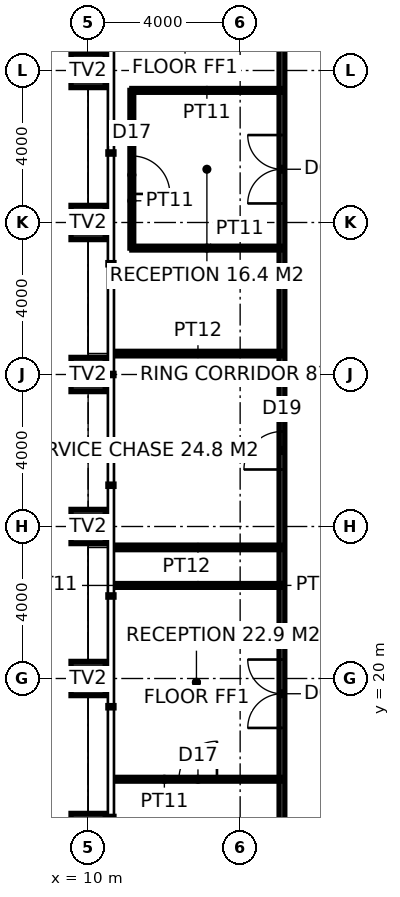
"""IFC4 building model, lengths in metres.
Left out: names, types, materials, properties, quantities, classifications, styles, units other than length and angle.
Written with IfcOpenShell. Run it as: python <this file> out.ifc"""

import sys

from ifc_helpers import new_model, si_unit, direction, frame, frame_2d, origin, origin_2d, place, context, subcontext, project, spatial, rectangle, hollow_rectangle, extrude, element, fill, save


model = new_model("IFC4")
c1 = context("Model", 3, precision=1e-05, world=origin(), true_north=direction((0.0, 1.0)))
c2 = subcontext(c1, "Body", "Model", "MODEL_VIEW")
j1 = project(units=[si_unit("LENGTHUNIT", "METRE"), si_unit("PLANEANGLEUNIT", "RADIAN")], contexts=[c1])
p1 = place(None, origin())
s1 = spatial("IfcSite", under=j1, at=p1, CompositionType="ELEMENT")
p2 = place(p1, origin())
s2 = spatial("IfcBuilding", under=s1, at=p2, CompositionType="ELEMENT")
p3 = place(p2, frame((0.0, 0.0, 105.4)))
s3 = spatial("IfcBuildingStorey", under=s2, at=p3, CompositionType="ELEMENT", Elevation=105.4)
for number, where, z_axis, x_axis in (
    (1, (10.0, 16.0, 0.0), (0.0, 0.0, 1.0), (1.0, 0.0, 0.0)),
    (2, (10.0, 20.0, 0.0), (0.0, 0.0, 1.0), (1.0, 0.0, 0.0)),
    (3, (10.0, 24.0, 0.0), (0.0, 0.0, 1.0), (1.0, 0.0, 0.0)),
    (4, (10.0, 28.0, 0.0), (0.0, 0.0, 1.0), (1.0, 0.0, 0.0)),
    (5, (10.0, 32.0, 0.0), (0.0, 0.0, 1.0), (1.0, 0.0, 0.0)),
    (6, (10.0, 36.0, 0.0), (0.0, 0.0, 1.0), (1.0, 0.0, 0.0)),
):
    element("IfcColumn", number, at=place(p3, frame(where, z_axis=z_axis, x_axis=x_axis)), inside=s3, PredefinedType="USERDEFINED", context=c2, shape_type="SweptSolid", body=[
        extrude(hollow_rectangle(XDim=0.9, YDim=0.9, WallThickness=0.1, at=origin_2d()), origin(), (0.0, 0.0, 1.0), 4.0),
    ])
p4 = place(p3, frame((15.1, 15.625, 0.0), z_axis=(0.0, 0.0, 1.0), x_axis=(0.0, 1.0, 0.0)))
e7 = element("IfcWall", 7, at=p4, inside=s3, PredefinedType="PARTITIONING", context=c2, shape_type="SweptSolid", body=[
    extrude(rectangle(XDim=22.75, YDim=0.15, at=frame_2d((11.375, 0.0))), origin(), (0.0, 0.0, 1.0), 3.85),
])
p5 = place(p4, frame((3.074, 0.0, 0.0)))
e8 = element("IfcOpeningElement", 8, at=p5, cuts=e7, PredefinedType="OPENING", context=c2, shape_type="SweptSolid", body=[
    extrude(rectangle(XDim=1.8, YDim=2.4, at=frame_2d((0.9, 1.2))), frame((0.0, 0.085, 0.0), z_axis=(0.0, -1.0, 0.0), x_axis=(1.0, 0.0, 0.0)), (0.0, 0.0, 1.0), 0.17),
])
p6 = place(p4, frame((16.876, 0.0, 0.0)))
e9 = element("IfcOpeningElement", 9, at=p6, cuts=e7, PredefinedType="OPENING", context=c2, shape_type="SweptSolid", body=[
    extrude(rectangle(XDim=1.8, YDim=2.4, at=frame_2d((0.9, 1.2))), frame((0.0, 0.085, 0.0), z_axis=(0.0, -1.0, 0.0), x_axis=(1.0, 0.0, 0.0)), (0.0, 0.0, 1.0), 0.17),
])
p7 = place(p4, frame((9.875, 0.0, 0.0)))
e10 = element("IfcOpeningElement", 10, at=p7, cuts=e7, PredefinedType="OPENING", context=c2, shape_type="SweptSolid", body=[
    extrude(rectangle(XDim=1.0, YDim=2.2, at=frame_2d((0.5, 1.1))), frame((0.0, 0.085, 0.0), z_axis=(0.0, -1.0, 0.0), x_axis=(1.0, 0.0, 0.0)), (0.0, 0.0, 1.0), 0.17),
])
for number, where, z_axis, x_axis in (
    (11, (10.68, 23.45, 0.0), (0.0, 0.0, 1.0), (1.0, 0.0, 0.0)),
    (12, (10.68, 28.55, 0.0), (0.0, 0.0, 1.0), (1.0, 0.0, 0.0)),
):
    element("IfcWall", number, at=place(p3, frame(where, z_axis=z_axis, x_axis=x_axis)), inside=s3, PredefinedType="PARTITIONING", context=c2, shape_type="SweptSolid", body=[
        extrude(rectangle(XDim=4.42, YDim=0.12, at=frame_2d((2.21, 0.0))), origin(), (0.0, 0.0, 1.0), 2.65),
    ])
p8 = place(p3, frame((15.1, 22.449, 0.0), z_axis=(0.0, 0.0, 1.0), x_axis=(-1.0, 0.0, 0.0)))
e13 = element("IfcWall", 13, at=p8, inside=s3, PredefinedType="PARTITIONING", context=c2, shape_type="SweptSolid", body=[
    extrude(rectangle(XDim=4.42, YDim=0.1, at=frame_2d((2.21, 0.0))), origin(), (0.0, 0.0, 1.0), 3.85),
])
p9 = place(p3, frame((10.68, 17.349, 0.0), z_axis=(0.0, 0.0, 1.0), x_axis=(1.0, 0.0, 0.0)))
e14 = element("IfcWall", 14, at=p9, inside=s3, PredefinedType="PARTITIONING", context=c2, shape_type="SweptSolid", body=[
    extrude(rectangle(XDim=4.42, YDim=0.1, at=frame_2d((2.21, 0.0))), origin(), (0.0, 0.0, 1.0), 3.85),
])
p10 = place(p9, frame((1.71, 0.0, 0.0)))
e15 = element("IfcOpeningElement", 15, at=p10, cuts=e14, PredefinedType="OPENING", context=c2, shape_type="SweptSolid", body=[
    extrude(rectangle(XDim=1.0, YDim=2.2, at=frame_2d((0.5, 1.1))), frame((0.0, 0.06, 0.0), z_axis=(0.0, -1.0, 0.0), x_axis=(1.0, 0.0, 0.0)), (0.0, 0.0, 1.0), 0.12),
])
p11 = place(p3, frame((15.1, 35.476, 0.0), z_axis=(0.0, 0.0, 1.0), x_axis=(-1.0, 0.0, 0.0)))
e16 = element("IfcWall", 16, at=p11, inside=s3, PredefinedType="PARTITIONING", context=c2, shape_type="SweptSolid", body=[
    extrude(rectangle(XDim=3.95, YDim=0.1, at=frame_2d((1.975, 0.0))), origin(), (0.0, 0.0, 1.0), 3.85),
])
p12 = place(p3, frame((11.15, 35.476, 0.0), z_axis=(0.0, 0.0, 1.0), x_axis=(0.0, -1.0, 0.0)))
e17 = element("IfcWall", 17, at=p12, inside=s3, PredefinedType="PARTITIONING", context=c2, shape_type="SweptSolid", body=[
    extrude(rectangle(XDim=4.15, YDim=0.1, at=frame_2d((2.075, 0.0))), origin(), (0.0, 0.0, 1.0), 3.85),
])
p13 = place(p12, frame((1.725, 0.0, 0.0)))
e18 = element("IfcOpeningElement", 18, at=p13, cuts=e17, PredefinedType="OPENING", context=c2, shape_type="SweptSolid", body=[
    extrude(rectangle(XDim=1.0, YDim=2.2, at=frame_2d((0.5, 1.1))), frame((0.0, 0.06, 0.0), z_axis=(0.0, -1.0, 0.0), x_axis=(1.0, 0.0, 0.0)), (0.0, 0.0, 1.0), 0.12),
])
p14 = place(p3, frame((11.15, 31.326, 0.0), z_axis=(0.0, 0.0, 1.0), x_axis=(1.0, 0.0, 0.0)))
e19 = element("IfcWall", 19, at=p14, inside=s3, PredefinedType="PARTITIONING", context=c2, shape_type="SweptSolid", body=[
    extrude(rectangle(XDim=3.95, YDim=0.1, at=frame_2d((1.975, 0.0))), origin(), (0.0, 0.0, 1.0), 3.85),
])
p15 = place(p5, origin())
e20 = element("IfcDoor", 20, at=p15, inside=s3, OperationType="DOUBLE_DOOR_DOUBLE_SWING", PredefinedType="DOOR", context=c2, shape_type="SweptSolid", body=[
    extrude(rectangle(XDim=1.8, YDim=2.4, at=frame_2d((0.9, 1.2))), frame((0.0, 0.025, 0.0), z_axis=(0.0, -1.0, 0.0), x_axis=(1.0, 0.0, 0.0)), (0.0, 0.0, 1.0), 0.05),
])
fill(e8, e20)
p16 = place(p6, origin())
e21 = element("IfcDoor", 21, at=p16, inside=s3, OperationType="DOUBLE_DOOR_DOUBLE_SWING", PredefinedType="DOOR", context=c2, shape_type="SweptSolid", body=[
    extrude(rectangle(XDim=1.8, YDim=2.4, at=frame_2d((0.9, 1.2))), frame((0.0, 0.025, 0.0), z_axis=(0.0, -1.0, 0.0), x_axis=(1.0, 0.0, 0.0)), (0.0, 0.0, 1.0), 0.05),
])
fill(e9, e21)
p17 = place(p7, origin())
e22 = element("IfcDoor", 22, at=p17, inside=s3, OperationType="SINGLE_SWING_LEFT", PredefinedType="DOOR", context=c2, shape_type="SweptSolid", body=[
    extrude(rectangle(XDim=1.0, YDim=2.2, at=frame_2d((0.5, 1.1))), frame((0.0, 0.025, 0.0), z_axis=(0.0, -1.0, 0.0), x_axis=(1.0, 0.0, 0.0)), (0.0, 0.0, 1.0), 0.05),
])
fill(e10, e22)
p18 = place(p10, origin())
e23 = element("IfcDoor", 23, at=p18, inside=s3, OperationType="SINGLE_SWING_RIGHT", PredefinedType="DOOR", context=c2, shape_type="SweptSolid", body=[
    extrude(rectangle(XDim=1.0, YDim=2.2, at=frame_2d((0.5, 1.1))), frame((0.0, 0.025, 0.0), z_axis=(0.0, -1.0, 0.0), x_axis=(1.0, 0.0, 0.0)), (0.0, 0.0, 1.0), 0.05),
])
fill(e15, e23)
p19 = place(p13, origin())
e24 = element("IfcDoor", 24, at=p19, inside=s3, OperationType="SINGLE_SWING_RIGHT", PredefinedType="DOOR", context=c2, shape_type="SweptSolid", body=[
    extrude(rectangle(XDim=1.0, YDim=2.2, at=frame_2d((0.5, 1.1))), frame((0.0, 0.025, 0.0), z_axis=(0.0, -1.0, 0.0), x_axis=(1.0, 0.0, 0.0)), (0.0, 0.0, 1.0), 0.05),
])
fill(e18, e24)
save(model, sys.argv[1])
